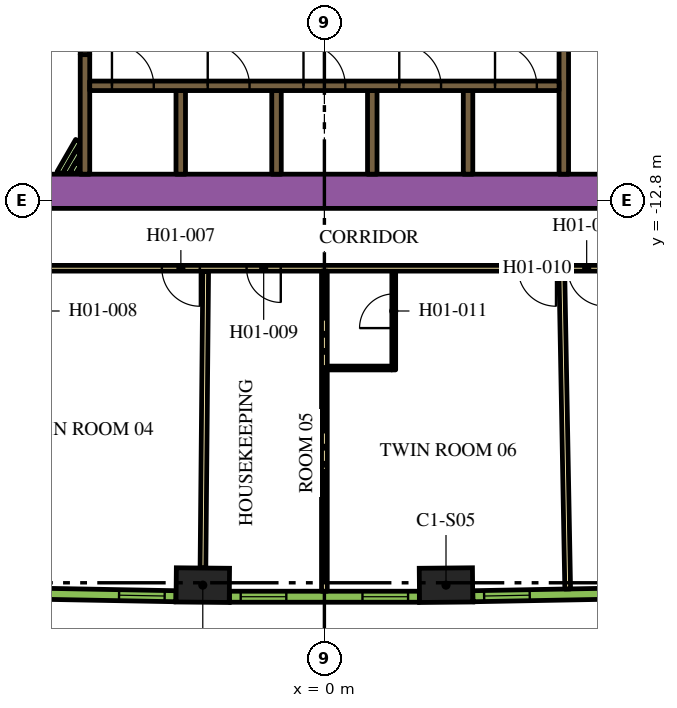
"""IFC4 building model, lengths in metres.
Left out: names, types, materials, properties, quantities, classifications, styles, units other than length and angle.
Written with IfcOpenShell. Run it as: python <this file> out.ifc"""

import sys

from ifc_helpers import new_model, si_unit, direction, frame, frame_2d, origin, origin_2d, place, context, subcontext, project, spatial, rectangle, extrude, element, fill, save


model = new_model("IFC4")
c1 = context("Model", 3, precision=1e-05, world=origin(), true_north=direction((0.0, 1.0)))
c2 = subcontext(c1, "Body", "Model", "MODEL_VIEW")
j1 = project(units=[si_unit("LENGTHUNIT", "METRE"), si_unit("PLANEANGLEUNIT", "RADIAN")], contexts=[c1])
p1 = place(None, origin())
s1 = spatial("IfcSite", under=j1, at=p1, CompositionType="ELEMENT")
p2 = place(p1, origin())
s2 = spatial("IfcBuilding", under=s1, at=p2, CompositionType="ELEMENT")
p3 = place(p2, frame((0.0, 0.0, 35.4)))
s3 = spatial("IfcBuildingStorey", under=s2, at=p3, CompositionType="ELEMENT", Elevation=35.4)
for number, where, z_axis, x_axis in (
    (1, (-3.2, -22.913, 0.0), (0.0, 0.0, 1.0), (1.0, -0.009, 0.0)),
    (2, (3.2, -22.913, 0.0), (0.0, 0.0, 1.0), (1.0, 0.009, 0.0)),
):
    element("IfcColumn", number, at=place(p3, frame(where, z_axis=z_axis, x_axis=x_axis)), inside=s3, PredefinedType="COLUMN", context=c2, shape_type="SweptSolid", body=[
        extrude(rectangle(XDim=1.4, YDim=0.9, at=origin_2d()), origin(), (0.0, 0.0, 1.0), 3.9),
    ])
p4 = place(p3, frame((-12.019, -12.55, 0.0), z_axis=(0.0, 0.0, 1.0), x_axis=(1.0, 0.0, 0.0)))
e3 = element("IfcWall", 3, at=p4, inside=s3, PredefinedType="SOLIDWALL", context=c2, shape_type="SweptSolid", body=[
    extrude(rectangle(XDim=21.63, YDim=0.9, at=frame_2d((10.815, 0.0))), origin(), (0.0, 0.0, 1.0), 3.9),
])
p5 = place(p3, frame((12.84, -9.261, 0.0), z_axis=(0.0, 0.0, 1.0), x_axis=(-0.866013990052, 0.500019768644, 0.0)))
e4 = element("IfcWall", 4, at=p5, inside=s3, PredefinedType="SOLIDWALL", context=c2, shape_type="SweptSolid", body=[
    extrude(rectangle(XDim=6.8, YDim=0.25, at=frame_2d((3.4, 0.0))), origin(), (0.0, 0.0, 1.0), 3.9),
])
p6 = place(p3, frame((-12.84, -9.261, 0.0), z_axis=(0.0, 0.0, 1.0), x_axis=(0.866016039709, 0.500016218704, 0.0)))
e5 = element("IfcWall", 5, at=p6, inside=s3, PredefinedType="SOLIDWALL", context=c2, shape_type="SweptSolid", body=[
    extrude(rectangle(XDim=7.05, YDim=0.25, at=frame_2d((3.525, 0.0))), origin(), (0.0, 0.0, 1.0), 3.9),
])
p7 = place(p3, frame((-3.78, -12.1, 0.0), z_axis=(0.0, 0.0, 1.0), x_axis=(0.0, 1.0, 0.0)))
e6 = element("IfcWall", 6, at=p7, inside=s3, PredefinedType="SOLIDWALL", context=c2, shape_type="SweptSolid", body=[
    extrude(rectangle(XDim=2.2, YDim=0.25, at=frame_2d((1.1, 0.0))), origin(), (0.0, 0.0, 1.0), 3.9),
])
p8 = place(p3, frame((-6.3, -12.1, 0.0), z_axis=(0.0, 0.0, 1.0), x_axis=(0.0, 1.0, 0.0)))
e7 = element("IfcWall", 7, at=p8, inside=s3, PredefinedType="SOLIDWALL", context=c2, shape_type="SweptSolid", body=[
    extrude(rectangle(XDim=3.146, YDim=0.25, at=frame_2d((1.573, 0.0))), origin(), (0.0, 0.0, 1.0), 3.9),
])
p9 = place(p3, frame((6.3, -8.67, 0.0), z_axis=(0.0, 0.0, 1.0), x_axis=(0.0, -1.0, 0.0)))
e8 = element("IfcWall", 8, at=p9, inside=s3, PredefinedType="SOLIDWALL", context=c2, shape_type="SweptSolid", body=[
    extrude(rectangle(XDim=3.43, YDim=0.25, at=frame_2d((1.715, 0.0))), origin(), (0.0, 0.0, 1.0), 3.9),
])
for number, where, z_axis, x_axis in (
    (9, (3.78, -12.1, 0.0), (0.0, 0.0, 1.0), (0.0, 1.0, 0.0)),
    (10, (1.26, -12.1, 0.0), (0.0, 0.0, 1.0), (0.0, 1.0, 0.0)),
    (11, (-1.26, -12.1, 0.0), (0.0, 0.0, 1.0), (0.0, 1.0, 0.0)),
):
    element("IfcWall", number, at=place(p3, frame(where, z_axis=z_axis, x_axis=x_axis)), inside=s3, PredefinedType="SOLIDWALL", context=c2, shape_type="SweptSolid", body=[
        extrude(rectangle(XDim=2.2, YDim=0.25, at=frame_2d((1.1, 0.0))), origin(), (0.0, 0.0, 1.0), 3.9),
    ])
p10 = place(p3, frame((-6.968, -12.068, 0.0), z_axis=(0.0, 0.0, 1.0), x_axis=(0.49998975084, 0.866031321059, 0.0)))
e12 = element("IfcWall", 12, at=p10, inside=s3, PredefinedType="PARTITIONING", context=c2, shape_type="SweptSolid", body=[
    extrude(rectangle(XDim=0.975, YDim=0.15, at=frame_2d((0.488, 0.0))), origin(), (0.0, 0.0, 1.0), 2.75),
])
p11 = place(p3, frame((-6.794, -12.068, 0.0), z_axis=(0.0, 0.0, 1.0), x_axis=(0.49985693963, 0.866107983974, 0.0)))
e13 = element("IfcWall", 13, at=p11, inside=s3, PredefinedType="PARTITIONING", context=c2, shape_type="SweptSolid", body=[
    extrude(rectangle(XDim=0.629, YDim=0.15, at=frame_2d((0.314, 0.0))), origin(), (0.0, 0.0, 1.0), 2.75),
])
p12 = place(p3, frame((-6.621, -12.068, 0.0), z_axis=(0.0, 0.0, 1.0), x_axis=(0.500046963369, 0.865998287773, 0.0)))
e14 = element("IfcWall", 14, at=p12, inside=s3, PredefinedType="PARTITIONING", context=c2, shape_type="SweptSolid", body=[
    extrude(rectangle(XDim=0.282, YDim=0.15, at=frame_2d((0.141, 0.0))), origin(), (0.0, 0.0, 1.0), 2.75),
])
p13 = place(p3, frame((-6.175, -9.775, 0.0), z_axis=(0.0, 0.0, 1.0), x_axis=(1.0, 0.0, 0.0)))
e15 = element("IfcWall", 15, at=p13, inside=s3, PredefinedType="SOLIDWALL", context=c2, shape_type="SweptSolid", body=[
    extrude(rectangle(XDim=12.35, YDim=0.25, at=frame_2d((6.175, 0.0))), origin(), (0.0, 0.0, 1.0), 3.9),
])
p14 = place(p13, frame((0.585, 0.0, 0.0)))
e16 = element("IfcOpeningElement", 16, at=p14, cuts=e15, PredefinedType="OPENING", context=c2, shape_type="SweptSolid", body=[
    extrude(rectangle(XDim=1.1, YDim=2.1, at=frame_2d((0.55, 1.05))), frame((0.0, 0.135, 0.0), z_axis=(0.0, -1.0, 0.0), x_axis=(1.0, 0.0, 0.0)), (0.0, 0.0, 1.0), 0.27),
])
p15 = place(p13, frame((3.105, 0.0, 0.0)))
e17 = element("IfcOpeningElement", 17, at=p15, cuts=e15, PredefinedType="OPENING", context=c2, shape_type="SweptSolid", body=[
    extrude(rectangle(XDim=1.1, YDim=2.1, at=frame_2d((0.55, 1.05))), frame((0.0, 0.135, 0.0), z_axis=(0.0, -1.0, 0.0), x_axis=(1.0, 0.0, 0.0)), (0.0, 0.0, 1.0), 0.27),
])
p16 = place(p13, frame((5.625, 0.0, 0.0)))
e18 = element("IfcOpeningElement", 18, at=p16, cuts=e15, PredefinedType="OPENING", context=c2, shape_type="SweptSolid", body=[
    extrude(rectangle(XDim=1.1, YDim=2.1, at=frame_2d((0.55, 1.05))), frame((0.0, 0.135, 0.0), z_axis=(0.0, -1.0, 0.0), x_axis=(1.0, 0.0, 0.0)), (0.0, 0.0, 1.0), 0.27),
])
p17 = place(p13, frame((8.145, 0.0, 0.0)))
e19 = element("IfcOpeningElement", 19, at=p17, cuts=e15, PredefinedType="OPENING", context=c2, shape_type="SweptSolid", body=[
    extrude(rectangle(XDim=1.1, YDim=2.1, at=frame_2d((0.55, 1.05))), frame((0.0, 0.135, 0.0), z_axis=(0.0, -1.0, 0.0), x_axis=(1.0, 0.0, 0.0)), (0.0, 0.0, 1.0), 0.27),
])
p18 = place(p13, frame((10.665, 0.0, 0.0)))
e20 = element("IfcOpeningElement", 20, at=p18, cuts=e15, PredefinedType="OPENING", context=c2, shape_type="SweptSolid", body=[
    extrude(rectangle(XDim=1.1, YDim=2.1, at=frame_2d((0.55, 1.05))), frame((0.0, 0.135, 0.0), z_axis=(0.0, -1.0, 0.0), x_axis=(1.0, 0.0, 0.0)), (0.0, 0.0, 1.0), 0.27),
])
p19 = place(p3, frame((-6.3, -7.154, 0.0), z_axis=(0.0, 0.0, 1.0), x_axis=(0.0, -1.0, 0.0)))
e21 = element("IfcWall", 21, at=p19, inside=s3, PredefinedType="SOLIDWALL", context=c2, shape_type="SweptSolid", body=[
    extrude(rectangle(XDim=1.8, YDim=0.25, at=frame_2d((0.9, 0.0))), origin(), (0.0, 0.0, 1.0), 3.9),
])
p20 = place(p19, frame((0.45, 0.0, 0.0)))
e22 = element("IfcOpeningElement", 22, at=p20, cuts=e21, PredefinedType="OPENING", context=c2, shape_type="SweptSolid", body=[
    extrude(rectangle(XDim=0.9, YDim=2.1, at=frame_2d((0.45, 1.05))), frame((0.0, 0.135, 0.0), z_axis=(0.0, -1.0, 0.0), x_axis=(1.0, 0.0, 0.0)), (0.0, 0.0, 1.0), 0.27),
])
p21 = place(p3, frame((12.918, -14.575, 0.0), z_axis=(0.0, 0.0, 1.0), x_axis=(-1.0, 0.0, 0.0)))
e23 = element("IfcWall", 23, at=p21, inside=s3, PredefinedType="PARTITIONING", context=c2, shape_type="SweptSolid", body=[
    extrude(rectangle(XDim=25.766, YDim=0.15, at=frame_2d((12.883, 0.0))), origin(), (0.0, 0.0, 1.0), 2.75),
])
p22 = place(p21, frame((24.586, 0.0, 0.0)))
e24 = element("IfcOpeningElement", 24, at=p22, cuts=e23, PredefinedType="OPENING", context=c2, shape_type="SweptSolid", body=[
    extrude(rectangle(XDim=1.0, YDim=2.1, at=frame_2d((0.5, 1.05))), frame((0.0, 0.085, 0.0), z_axis=(0.0, -1.0, 0.0), x_axis=(1.0, 0.0, 0.0)), (0.0, 0.0, 1.0), 0.17),
])
p23 = place(p21, frame((16.195, 0.0, 0.0)))
e25 = element("IfcOpeningElement", 25, at=p23, cuts=e23, PredefinedType="OPENING", context=c2, shape_type="SweptSolid", body=[
    extrude(rectangle(XDim=1.0, YDim=2.1, at=frame_2d((0.5, 1.05))), frame((0.0, 0.085, 0.0), z_axis=(0.0, -1.0, 0.0), x_axis=(1.0, 0.0, 0.0)), (0.0, 0.0, 1.0), 0.17),
])
p24 = place(p21, frame((14.066, 0.0, 0.0)))
e26 = element("IfcOpeningElement", 26, at=p24, cuts=e23, PredefinedType="OPENING", context=c2, shape_type="SweptSolid", body=[
    extrude(rectangle(XDim=0.9, YDim=2.1, at=frame_2d((0.45, 1.05))), frame((0.0, 0.085, 0.0), z_axis=(0.0, -1.0, 0.0), x_axis=(1.0, 0.0, 0.0)), (0.0, 0.0, 1.0), 0.17),
])
p25 = place(p21, frame((6.824, 0.0, 0.0)))
e27 = element("IfcOpeningElement", 27, at=p25, cuts=e23, PredefinedType="OPENING", context=c2, shape_type="SweptSolid", body=[
    extrude(rectangle(XDim=1.0, YDim=2.1, at=frame_2d((0.5, 1.05))), frame((0.0, 0.085, 0.0), z_axis=(0.0, -1.0, 0.0), x_axis=(1.0, 0.0, 0.0)), (0.0, 0.0, 1.0), 0.17),
])
p26 = place(p21, frame((5.517, 0.0, 0.0)))
e28 = element("IfcOpeningElement", 28, at=p26, cuts=e23, PredefinedType="OPENING", context=c2, shape_type="SweptSolid", body=[
    extrude(rectangle(XDim=1.0, YDim=2.1, at=frame_2d((0.5, 1.05))), frame((0.0, 0.085, 0.0), z_axis=(0.0, -1.0, 0.0), x_axis=(1.0, 0.0, 0.0)), (0.0, 0.0, 1.0), 0.17),
])
p27 = place(p3, frame((-3.196, -22.463, 0.0), z_axis=(0.0, 0.0, 1.0), x_axis=(0.00926060032, 0.999957119721, 0.0)))
e29 = element("IfcWall", 29, at=p27, inside=s3, PredefinedType="PARTITIONING", context=c2, shape_type="SweptSolid", body=[
    extrude(rectangle(XDim=7.803, YDim=0.15, at=frame_2d((3.902, 0.0))), origin(), (0.0, 0.0, 1.0), 2.75),
])
p28 = place(p3, frame((0.0, -23.073, 0.0), z_axis=(0.0, 0.0, 1.0), x_axis=(0.0, 1.0, 0.0)))
e30 = element("IfcWall", 30, at=p28, inside=s3, PredefinedType="PARTITIONING", context=c2, shape_type="SweptSolid", body=[
    extrude(rectangle(XDim=8.423, YDim=0.15, at=frame_2d((4.212, 0.0))), origin(), (0.0, 0.0, 1.0), 2.75),
])
p29 = place(p3, frame((6.402, -23.014, 0.0), z_axis=(0.0, 0.0, 1.0), x_axis=(-0.01849587109, 0.999828936745, 0.0)))
e31 = element("IfcWall", 31, at=p29, inside=s3, PredefinedType="PARTITIONING", context=c2, shape_type="SweptSolid", body=[
    extrude(rectangle(XDim=8.355, YDim=0.15, at=frame_2d((4.178, 0.0))), origin(), (0.0, 0.0, 1.0), 2.75),
])
p30 = place(p3, frame((1.825, -17.25, 0.0), z_axis=(0.0, 0.0, 1.0), x_axis=(0.0, 1.0, 0.0)))
e32 = element("IfcWall", 32, at=p30, inside=s3, PredefinedType="PARTITIONING", context=c2, shape_type="SweptSolid", body=[
    extrude(rectangle(XDim=2.6, YDim=0.1, at=frame_2d((1.3, 0.0))), origin(), (0.0, 0.0, 1.0), 2.75),
])
p31 = place(p30, frame((1.1, 0.0, 0.0)))
e33 = element("IfcOpeningElement", 33, at=p31, cuts=e32, PredefinedType="OPENING", context=c2, shape_type="SweptSolid", body=[
    extrude(rectangle(XDim=0.9, YDim=2.1, at=frame_2d((0.45, 1.05))), frame((0.0, 0.06, 0.0), z_axis=(0.0, -1.0, 0.0), x_axis=(1.0, 0.0, 0.0)), (0.0, 0.0, 1.0), 0.12),
])
p32 = place(p3, frame((1.775, -17.2, 0.0), z_axis=(0.0, 0.0, 1.0), x_axis=(-1.0, 0.0, 0.0)))
e34 = element("IfcWall", 34, at=p32, inside=s3, PredefinedType="PARTITIONING", context=c2, shape_type="SweptSolid", body=[
    extrude(rectangle(XDim=1.7, YDim=0.1, at=frame_2d((0.85, 0.0))), origin(), (0.0, 0.0, 1.0), 2.75),
])
p33 = place(p3, frame((-8.904, -23.113, 0.0), z_axis=(0.0, 0.0, 1.0), x_axis=(0.999829529479, -0.018463801951, 0.0)))
e35 = element("IfcWall", 35, at=p33, inside=s3, PredefinedType="SOLIDWALL", context=c2, shape_type="SweptSolid", body=[
    extrude(rectangle(XDim=4.998, YDim=0.29, at=frame_2d((2.499, 0.0))), origin(), (0.0, 0.0, 1.0), 3.65),
])
p34 = place(p33, frame((0.297, 0.0, 0.9)))
e36 = element("IfcOpeningElement", 36, at=p34, cuts=e35, PredefinedType="OPENING", context=c2, shape_type="SweptSolid", body=[
    extrude(rectangle(XDim=1.2, YDim=2.15, at=frame_2d((0.6, 1.075))), frame((0.0, 0.155, 0.0), z_axis=(0.0, -1.0, 0.0), x_axis=(1.0, 0.0, 0.0)), (0.0, 0.0, 1.0), 0.31),
])
p35 = place(p33, frame((3.501, 0.0, 0.9)))
e37 = element("IfcOpeningElement", 37, at=p35, cuts=e35, PredefinedType="OPENING", context=c2, shape_type="SweptSolid", body=[
    extrude(rectangle(XDim=1.2, YDim=2.15, at=frame_2d((0.6, 1.075))), frame((0.0, 0.155, 0.0), z_axis=(0.0, -1.0, 0.0), x_axis=(1.0, 0.0, 0.0)), (0.0, 0.0, 1.0), 0.31),
])
p36 = place(p3, frame((-2.499, -23.218, 0.0), z_axis=(0.0, 0.0, 1.0), x_axis=(1.0, 0.0, 0.0)))
e38 = element("IfcWall", 38, at=p36, inside=s3, PredefinedType="SOLIDWALL", context=c2, shape_type="SweptSolid", body=[
    extrude(rectangle(XDim=4.998, YDim=0.29, at=frame_2d((2.499, 0.0))), origin(), (0.0, 0.0, 1.0), 3.65),
])
p37 = place(p36, frame((0.297, 0.0, 0.9)))
e39 = element("IfcOpeningElement", 39, at=p37, cuts=e38, PredefinedType="OPENING", context=c2, shape_type="SweptSolid", body=[
    extrude(rectangle(XDim=1.2, YDim=2.15, at=frame_2d((0.6, 1.075))), frame((0.0, 0.155, 0.0), z_axis=(0.0, -1.0, 0.0), x_axis=(1.0, 0.0, 0.0)), (0.0, 0.0, 1.0), 0.31),
])
p38 = place(p36, frame((3.501, 0.0, 0.9)))
e40 = element("IfcOpeningElement", 40, at=p38, cuts=e38, PredefinedType="OPENING", context=c2, shape_type="SweptSolid", body=[
    extrude(rectangle(XDim=1.2, YDim=2.15, at=frame_2d((0.6, 1.075))), frame((0.0, 0.155, 0.0), z_axis=(0.0, -1.0, 0.0), x_axis=(1.0, 0.0, 0.0)), (0.0, 0.0, 1.0), 0.31),
])
p39 = place(p3, frame((3.906, -23.205, 0.0), z_axis=(0.0, 0.0, 1.0), x_axis=(0.999829529479, 0.018463801951, 0.0)))
e41 = element("IfcWall", 41, at=p39, inside=s3, PredefinedType="SOLIDWALL", context=c2, shape_type="SweptSolid", body=[
    extrude(rectangle(XDim=4.998, YDim=0.29, at=frame_2d((2.499, 0.0))), origin(), (0.0, 0.0, 1.0), 3.65),
])
p40 = place(p39, frame((0.297, 0.0, 0.9)))
e42 = element("IfcOpeningElement", 42, at=p40, cuts=e41, PredefinedType="OPENING", context=c2, shape_type="SweptSolid", body=[
    extrude(rectangle(XDim=1.2, YDim=2.15, at=frame_2d((0.6, 1.075))), frame((0.0, 0.155, 0.0), z_axis=(0.0, -1.0, 0.0), x_axis=(1.0, 0.0, 0.0)), (0.0, 0.0, 1.0), 0.31),
])
p41 = place(p39, frame((3.501, 0.0, 0.9)))
e43 = element("IfcOpeningElement", 43, at=p41, cuts=e41, PredefinedType="OPENING", context=c2, shape_type="SweptSolid", body=[
    extrude(rectangle(XDim=1.2, YDim=2.15, at=frame_2d((0.6, 1.075))), frame((0.0, 0.155, 0.0), z_axis=(0.0, -1.0, 0.0), x_axis=(1.0, 0.0, 0.0)), (0.0, 0.0, 1.0), 0.31),
])
p42 = place(p14, origin())
e44 = element("IfcDoor", 44, at=p42, inside=s3, OperationType="DOUBLE_DOOR_SLIDING", PredefinedType="DOOR", context=c2, shape_type="SweptSolid", body=[
    extrude(rectangle(XDim=1.1, YDim=2.1, at=frame_2d((0.55, 1.05))), frame((0.0, 0.025, 0.0), z_axis=(0.0, -1.0, 0.0), x_axis=(1.0, 0.0, 0.0)), (0.0, 0.0, 1.0), 0.05),
])
fill(e16, e44)
p43 = place(p15, origin())
e45 = element("IfcDoor", 45, at=p43, inside=s3, OperationType="DOUBLE_DOOR_SLIDING", PredefinedType="DOOR", context=c2, shape_type="SweptSolid", body=[
    extrude(rectangle(XDim=1.1, YDim=2.1, at=frame_2d((0.55, 1.05))), frame((0.0, 0.025, 0.0), z_axis=(0.0, -1.0, 0.0), x_axis=(1.0, 0.0, 0.0)), (0.0, 0.0, 1.0), 0.05),
])
fill(e17, e45)
p44 = place(p16, origin())
e46 = element("IfcDoor", 46, at=p44, inside=s3, OperationType="DOUBLE_DOOR_SLIDING", PredefinedType="DOOR", context=c2, shape_type="SweptSolid", body=[
    extrude(rectangle(XDim=1.1, YDim=2.1, at=frame_2d((0.55, 1.05))), frame((0.0, 0.025, 0.0), z_axis=(0.0, -1.0, 0.0), x_axis=(1.0, 0.0, 0.0)), (0.0, 0.0, 1.0), 0.05),
])
fill(e18, e46)
p45 = place(p17, origin())
e47 = element("IfcDoor", 47, at=p45, inside=s3, OperationType="DOUBLE_DOOR_SLIDING", PredefinedType="DOOR", context=c2, shape_type="SweptSolid", body=[
    extrude(rectangle(XDim=1.1, YDim=2.1, at=frame_2d((0.55, 1.05))), frame((0.0, 0.025, 0.0), z_axis=(0.0, -1.0, 0.0), x_axis=(1.0, 0.0, 0.0)), (0.0, 0.0, 1.0), 0.05),
])
fill(e19, e47)
p46 = place(p18, origin())
e48 = element("IfcDoor", 48, at=p46, inside=s3, OperationType="DOUBLE_DOOR_SLIDING", PredefinedType="DOOR", context=c2, shape_type="SweptSolid", body=[
    extrude(rectangle(XDim=1.1, YDim=2.1, at=frame_2d((0.55, 1.05))), frame((0.0, 0.025, 0.0), z_axis=(0.0, -1.0, 0.0), x_axis=(1.0, 0.0, 0.0)), (0.0, 0.0, 1.0), 0.05),
])
fill(e20, e48)
p47 = place(p23, origin())
e49 = element("IfcDoor", 49, at=p47, inside=s3, OperationType="SINGLE_SWING_LEFT", PredefinedType="DOOR", context=c2, shape_type="SweptSolid", body=[
    extrude(rectangle(XDim=1.0, YDim=2.1, at=frame_2d((0.5, 1.05))), frame((0.0, 0.025, 0.0), z_axis=(0.0, -1.0, 0.0), x_axis=(1.0, 0.0, 0.0)), (0.0, 0.0, 1.0), 0.05),
])
fill(e25, e49)
p48 = place(p24, origin())
e50 = element("IfcDoor", 50, at=p48, inside=s3, OperationType="SINGLE_SWING_LEFT", PredefinedType="DOOR", context=c2, shape_type="SweptSolid", body=[
    extrude(rectangle(XDim=0.9, YDim=2.1, at=frame_2d((0.45, 1.05))), frame((0.0, 0.025, 0.0), z_axis=(0.0, -1.0, 0.0), x_axis=(1.0, 0.0, 0.0)), (0.0, 0.0, 1.0), 0.05),
])
fill(e26, e50)
p49 = place(p25, origin())
e51 = element("IfcDoor", 51, at=p49, inside=s3, OperationType="SINGLE_SWING_LEFT", PredefinedType="DOOR", context=c2, shape_type="SweptSolid", body=[
    extrude(rectangle(XDim=1.0, YDim=2.1, at=frame_2d((0.5, 1.05))), frame((0.0, 0.025, 0.0), z_axis=(0.0, -1.0, 0.0), x_axis=(1.0, 0.0, 0.0)), (0.0, 0.0, 1.0), 0.05),
])
fill(e27, e51)
p50 = place(p31, origin())
e52 = element("IfcDoor", 52, at=p50, inside=s3, OperationType="SINGLE_SWING_RIGHT", PredefinedType="DOOR", context=c2, shape_type="SweptSolid", body=[
    extrude(rectangle(XDim=0.9, YDim=2.1, at=frame_2d((0.45, 1.05))), frame((0.0, 0.025, 0.0), z_axis=(0.0, -1.0, 0.0), x_axis=(1.0, 0.0, 0.0)), (0.0, 0.0, 1.0), 0.05),
])
fill(e33, e52)
p51 = place(p26, origin())
e53 = element("IfcDoor", 53, at=p51, inside=s3, OperationType="SINGLE_SWING_RIGHT", PredefinedType="DOOR", context=c2, shape_type="SweptSolid", body=[
    extrude(rectangle(XDim=1.0, YDim=2.1, at=frame_2d((0.5, 1.05))), frame((0.0, 0.025, 0.0), z_axis=(0.0, -1.0, 0.0), x_axis=(1.0, 0.0, 0.0)), (0.0, 0.0, 1.0), 0.05),
])
fill(e28, e53)
p52 = place(p35, origin())
e54 = element("IfcWindow", 54, at=p52, inside=s3, PartitioningType="DOUBLE_PANEL_VERTICAL", PredefinedType="WINDOW", context=c2, shape_type="SweptSolid", body=[
    extrude(rectangle(XDim=1.2, YDim=2.15, at=frame_2d((0.6, 1.075))), frame((0.0, 0.015, 0.0), z_axis=(0.0, -1.0, 0.0), x_axis=(1.0, 0.0, 0.0)), (0.0, 0.0, 1.0), 0.06),
])
fill(e37, e54)
p53 = place(p37, origin())
e55 = element("IfcWindow", 55, at=p53, inside=s3, PartitioningType="DOUBLE_PANEL_VERTICAL", PredefinedType="WINDOW", context=c2, shape_type="SweptSolid", body=[
    extrude(rectangle(XDim=1.2, YDim=2.15, at=frame_2d((0.6, 1.075))), frame((0.0, 0.015, 0.0), z_axis=(0.0, -1.0, 0.0), x_axis=(1.0, 0.0, 0.0)), (0.0, 0.0, 1.0), 0.06),
])
fill(e39, e55)
p54 = place(p38, origin())
e56 = element("IfcWindow", 56, at=p54, inside=s3, PartitioningType="DOUBLE_PANEL_VERTICAL", PredefinedType="WINDOW", context=c2, shape_type="SweptSolid", body=[
    extrude(rectangle(XDim=1.2, YDim=2.15, at=frame_2d((0.6, 1.075))), frame((0.0, 0.015, 0.0), z_axis=(0.0, -1.0, 0.0), x_axis=(1.0, 0.0, 0.0)), (0.0, 0.0, 1.0), 0.06),
])
fill(e40, e56)
p55 = place(p40, origin())
e57 = element("IfcWindow", 57, at=p55, inside=s3, PartitioningType="DOUBLE_PANEL_VERTICAL", PredefinedType="WINDOW", context=c2, shape_type="SweptSolid", body=[
    extrude(rectangle(XDim=1.2, YDim=2.15, at=frame_2d((0.6, 1.075))), frame((0.0, 0.015, 0.0), z_axis=(0.0, -1.0, 0.0), x_axis=(1.0, 0.0, 0.0)), (0.0, 0.0, 1.0), 0.06),
])
fill(e42, e57)
save(model, sys.argv[1])
